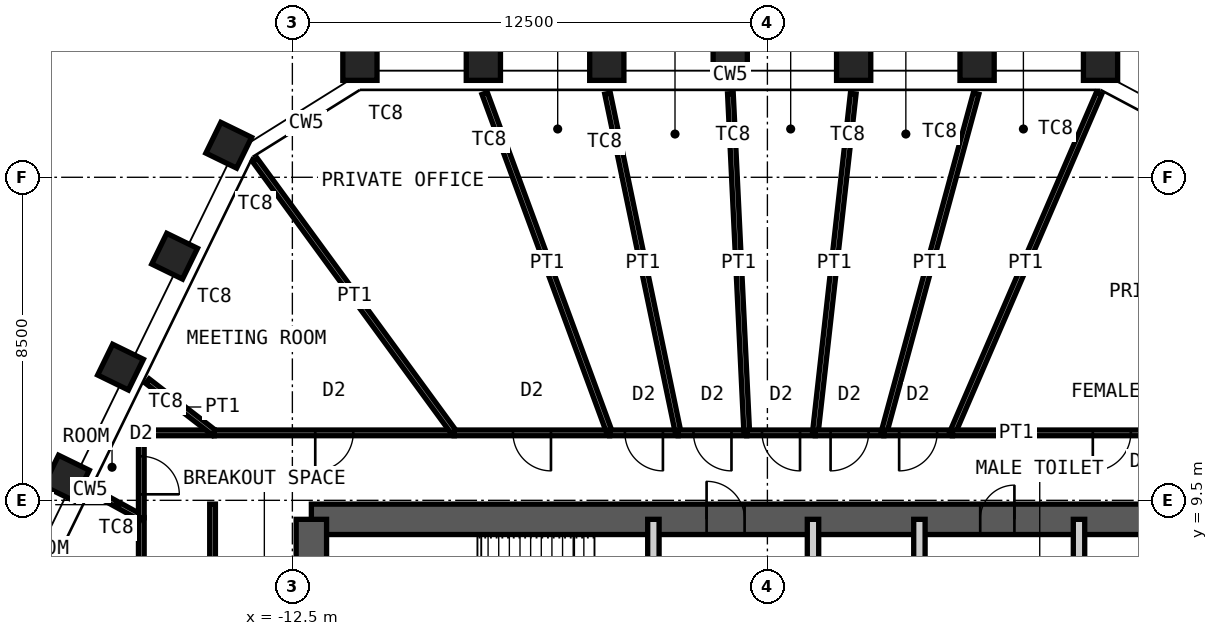
"""IFC4 building model, lengths in metres.
Left out: names, types, materials, properties, quantities, classifications, styles, units other than length and angle.
Written with IfcOpenShell. Run it as: python <this file> out.ifc"""

import sys

from ifc_helpers import new_model, si_unit, direction, frame, frame_2d, origin, origin_2d, place, context, subcontext, project, spatial, rectangle, hollow_rectangle, extrude, element, fill, save


model = new_model("IFC4")
c1 = context("Model", 3, precision=1e-05, world=origin(), true_north=direction((0.0, 1.0)))
c2 = subcontext(c1, "Body", "Model", "MODEL_VIEW")
j1 = project(units=[si_unit("LENGTHUNIT", "METRE"), si_unit("PLANEANGLEUNIT", "RADIAN")], contexts=[c1])
p1 = place(None, origin())
s1 = spatial("IfcSite", under=j1, at=p1, CompositionType="ELEMENT")
p2 = place(p1, origin())
s2 = spatial("IfcBuilding", under=s1, at=p2, CompositionType="ELEMENT")
p3 = place(p2, frame((0.0, 0.0, 312.4)))
s3 = spatial("IfcBuildingStorey", under=s2, at=p3, CompositionType="ELEMENT", Elevation=312.4)
for number, where, z_axis, x_axis in (
    (1, (-10.722, 21.0, 0.0), (0.0, 0.0, 1.0), (-1.0, 0.0, 0.0)),
    (2, (-7.474, 21.0, 0.0), (0.0, 0.0, 1.0), (-1.0, 0.0, 0.0)),
    (3, (-4.226, 21.0, 0.0), (0.0, 0.0, 1.0), (-1.0, 0.0, 0.0)),
    (4, (-0.978, 21.0, 0.0), (0.0, 0.0, 1.0), (-1.0, 0.0, 0.0)),
    (5, (2.27, 21.0, 0.0), (0.0, 0.0, 1.0), (-1.0, 0.0, 0.0)),
    (6, (5.518, 21.0, 0.0), (0.0, 0.0, 1.0), (-1.0, 0.0, 0.0)),
    (7, (8.766, 21.0, 0.0), (0.0, 0.0, 1.0), (-1.0, 0.0, 0.0)),
    (8, (-18.446, 10.085, 0.0), (0.0, 0.0, 1.0), (-0.438, -0.899, 0.0)),
    (9, (-17.022, 13.004, 0.0), (0.0, 0.0, 1.0), (-0.438, -0.899, 0.0)),
    (10, (-15.598, 15.924, 0.0), (0.0, 0.0, 1.0), (-0.438, -0.899, 0.0)),
    (11, (-14.174, 18.843, 0.0), (0.0, 0.0, 1.0), (-0.438, -0.899, 0.0)),
):
    element("IfcColumn", number, at=place(p3, frame(where, z_axis=z_axis, x_axis=x_axis)), inside=s3, PredefinedType="COLUMN", context=c2, shape_type="SweptSolid", body=[
        extrude(hollow_rectangle(XDim=0.9, YDim=0.9, WallThickness=0.05, at=origin_2d()), origin(), (0.0, 0.0, 1.0), 4.2),
    ])
p4 = place(p3, frame((-12.0, 9.0, 0.0), z_axis=(0.0, 0.0, 1.0), x_axis=(1.0, 0.0, 0.0)))
e12 = element("IfcWall", 12, at=p4, inside=s3, PredefinedType="SHEAR", context=c2, shape_type="SweptSolid", body=[
    extrude(rectangle(XDim=24.0, YDim=0.8, at=frame_2d((12.0, 0.0))), origin(), (0.0, 0.0, 1.0), 4.2),
])
p5 = place(p4, frame((10.4, 0.0, 0.0)))
e13 = element("IfcOpeningElement", 13, at=p5, cuts=e12, PredefinedType="OPENING", context=c2, shape_type="SweptSolid", body=[
    extrude(rectangle(XDim=1.0, YDim=2.1, at=frame_2d((0.5, 1.05))), frame((0.0, 0.41, 0.0), z_axis=(0.0, -1.0, 0.0), x_axis=(1.0, 0.0, 0.0)), (0.0, 0.0, 1.0), 0.82),
])
p6 = place(p4, frame((17.6, 0.0, 0.0)))
e14 = element("IfcOpeningElement", 14, at=p6, cuts=e12, PredefinedType="OPENING", context=c2, shape_type="SweptSolid", body=[
    extrude(rectangle(XDim=0.9, YDim=2.1, at=frame_2d((0.45, 1.05))), frame((0.0, 0.41, 0.0), z_axis=(0.0, -1.0, 0.0), x_axis=(1.0, 0.0, 0.0)), (0.0, 0.0, 1.0), 0.82),
])
p7 = place(p4, frame((21.9, 0.0, 0.0)))
e15 = element("IfcOpeningElement", 15, at=p7, cuts=e12, PredefinedType="OPENING", context=c2, shape_type="SweptSolid", body=[
    extrude(rectangle(XDim=0.9, YDim=2.1, at=frame_2d((0.45, 1.05))), frame((0.0, 0.41, 0.0), z_axis=(0.0, -1.0, 0.0), x_axis=(1.0, 0.0, 0.0)), (0.0, 0.0, 1.0), 0.82),
])
p8 = place(p3, frame((-12.0, -9.0, 0.0), z_axis=(0.0, 0.0, 1.0), x_axis=(0.0, 1.0, 0.0)))
e16 = element("IfcWall", 16, at=p8, inside=s3, PredefinedType="SHEAR", context=c2, shape_type="SweptSolid", body=[
    extrude(rectangle(XDim=18.0, YDim=0.8, at=frame_2d((9.0, 0.0))), origin(), (0.0, 0.0, 1.0), 4.2),
])
p9 = place(p8, frame((8.1, 0.0, 0.0)))
e17 = element("IfcOpeningElement", 17, at=p9, cuts=e16, PredefinedType="OPENING", context=c2, shape_type="SweptSolid", body=[
    extrude(rectangle(XDim=1.8, YDim=2.1, at=frame_2d((0.9, 1.05))), frame((0.0, 0.41, 0.0), z_axis=(0.0, -1.0, 0.0), x_axis=(1.0, 0.0, 0.0)), (0.0, 0.0, 1.0), 0.82),
])
p10 = place(p3, frame((-3.0, 5.15, 0.0), z_axis=(0.0, 0.0, 1.0), x_axis=(0.0, 1.0, 0.0)))
e18 = element("IfcWall", 18, at=p10, inside=s3, PredefinedType="PARTITIONING", context=c2, shape_type="SweptSolid", body=[
    extrude(rectangle(XDim=3.85, YDim=0.3, at=frame_2d((1.925, 0.0))), origin(), (0.0, 0.0, 1.0), 3.98),
])
p11 = place(p10, frame((1.425, 0.0, 0.0)))
e19 = element("IfcOpeningElement", 19, at=p11, cuts=e18, PredefinedType="OPENING", context=c2, shape_type="SweptSolid", body=[
    extrude(rectangle(XDim=1.0, YDim=2.1, at=frame_2d((0.5, 1.05))), frame((0.0, 0.16, 0.0), z_axis=(0.0, -1.0, 0.0), x_axis=(1.0, 0.0, 0.0)), (0.0, 0.0, 1.0), 0.32),
])
p12 = place(p3, frame((1.2, 5.15, 0.0), z_axis=(0.0, 0.0, 1.0), x_axis=(0.0, 1.0, 0.0)))
e20 = element("IfcWall", 20, at=p12, inside=s3, PredefinedType="PARTITIONING", context=c2, shape_type="SweptSolid", body=[
    extrude(rectangle(XDim=3.85, YDim=0.3, at=frame_2d((1.925, 0.0))), origin(), (0.0, 0.0, 1.0), 3.98),
])
p13 = place(p12, frame((1.375, 0.0, 0.0)))
e21 = element("IfcOpeningElement", 21, at=p13, cuts=e20, PredefinedType="OPENING", context=c2, shape_type="SweptSolid", body=[
    extrude(rectangle(XDim=1.1, YDim=2.4, at=frame_2d((0.55, 1.2))), frame((0.0, 0.16, 0.0), z_axis=(0.0, -1.0, 0.0), x_axis=(1.0, 0.0, 0.0)), (0.0, 0.0, 1.0), 0.32),
])
for number, where, z_axis, x_axis in (
    (22, (4.0, 5.15, 0.0), (0.0, 0.0, 1.0), (0.0, 1.0, 0.0)),
    (23, (8.2, 5.15, 0.0), (0.0, 0.0, 1.0), (0.0, 1.0, 0.0)),
):
    element("IfcWall", number, at=place(p3, frame(where, z_axis=z_axis, x_axis=x_axis)), inside=s3, PredefinedType="PARTITIONING", context=c2, shape_type="SweptSolid", body=[
        extrude(rectangle(XDim=3.85, YDim=0.3, at=frame_2d((1.925, 0.0))), origin(), (0.0, 0.0, 1.0), 3.98),
    ])
p14 = place(p3, frame((-16.475, 5.873, 0.0), z_axis=(0.0, 0.0, 1.0), x_axis=(0.0, 1.0, 0.0)))
e24 = element("IfcWall", 24, at=p14, inside=s3, PredefinedType="PARTITIONING", context=c2, shape_type="SweptSolid", body=[
    extrude(rectangle(XDim=3.169, YDim=0.15, at=frame_2d((1.584, 0.0))), origin(), (0.0, 0.0, 1.0), 4.03),
])
p15 = place(p14, frame((1.084, 0.0, 0.0)))
e25 = element("IfcOpeningElement", 25, at=p15, cuts=e24, PredefinedType="OPENING", context=c2, shape_type="SweptSolid", body=[
    extrude(rectangle(XDim=1.0, YDim=2.4, at=frame_2d((0.5, 1.2))), frame((0.0, 0.085, 0.0), z_axis=(0.0, -1.0, 0.0), x_axis=(1.0, 0.0, 0.0)), (0.0, 0.0, 1.0), 0.17),
])
p16 = place(p3, frame((-17.729, 9.73, 0.0), z_axis=(0.0, 0.0, 1.0), x_axis=(0.876633607687, -0.481158516369, 0.0)))
e26 = element("IfcWall", 26, at=p16, inside=s3, PredefinedType="PARTITIONING", context=c2, shape_type="SweptSolid", body=[
    extrude(rectangle(XDim=1.43, YDim=0.15, at=frame_2d((0.715, 0.0))), origin(), (0.0, 0.0, 1.0), 3.33),
])
p17 = place(p3, frame((-16.475, 9.042, 0.0), z_axis=(0.0, 0.0, 1.0), x_axis=(0.0, 1.0, 0.0)))
e27 = element("IfcWall", 27, at=p17, inside=s3, PredefinedType="PARTITIONING", context=c2, shape_type="SweptSolid", body=[
    extrude(rectangle(XDim=2.233, YDim=0.15, at=frame_2d((1.117, 0.0))), origin(), (0.0, 0.0, 1.0), 4.03),
])
p18 = place(p17, frame((0.617, 0.0, 0.0)))
e28 = element("IfcOpeningElement", 28, at=p18, cuts=e27, PredefinedType="OPENING", context=c2, shape_type="SweptSolid", body=[
    extrude(rectangle(XDim=1.0, YDim=2.4, at=frame_2d((0.5, 1.2))), frame((0.0, 0.085, 0.0), z_axis=(0.0, -1.0, 0.0), x_axis=(1.0, 0.0, 0.0)), (0.0, 0.0, 1.0), 0.17),
])
p19 = place(p3, frame((-16.475, 11.275, 0.0), z_axis=(0.0, 0.0, 1.0), x_axis=(1.0, 0.0, 0.0)))
e29 = element("IfcWall", 29, at=p19, inside=s3, PredefinedType="PARTITIONING", context=c2, shape_type="SweptSolid", body=[
    extrude(rectangle(XDim=1.919, YDim=0.15, at=frame_2d((0.959, 0.0))), origin(), (0.0, 0.0, 1.0), 4.03),
])
p20 = place(p3, frame((-16.314, 12.636, 0.0), z_axis=(0.0, 0.0, 1.0), x_axis=(0.790545318909, -0.612403542406, 0.0)))
e30 = element("IfcWall", 30, at=p20, inside=s3, PredefinedType="PARTITIONING", context=c2, shape_type="SweptSolid", body=[
    extrude(rectangle(XDim=2.223, YDim=0.15, at=frame_2d((1.111, 0.0))), origin(), (0.0, 0.0, 1.0), 3.33),
])
p21 = place(p3, frame((-14.556, 11.275, 0.0), z_axis=(0.0, 0.0, 1.0), x_axis=(1.0, 0.0, 0.0)))
e31 = element("IfcWall", 31, at=p21, inside=s3, PredefinedType="PARTITIONING", context=c2, shape_type="SweptSolid", body=[
    extrude(rectangle(XDim=6.317, YDim=0.15, at=frame_2d((3.159, 0.0))), origin(), (0.0, 0.0, 1.0), 4.03),
])
p22 = place(p21, frame((2.659, 0.0, 0.0)))
e32 = element("IfcOpeningElement", 32, at=p22, cuts=e31, PredefinedType="OPENING", context=c2, shape_type="SweptSolid", body=[
    extrude(rectangle(XDim=1.0, YDim=2.4, at=frame_2d((0.5, 1.2))), frame((0.0, 0.085, 0.0), z_axis=(0.0, -1.0, 0.0), x_axis=(1.0, 0.0, 0.0)), (0.0, 0.0, 1.0), 0.17),
])
p23 = place(p3, frame((-13.486, 18.455, 0.0), z_axis=(0.0, 0.0, 1.0), x_axis=(0.589986991866, -0.80741275035, 0.0)))
e33 = element("IfcWall", 33, at=p23, inside=s3, PredefinedType="PARTITIONING", context=c2, shape_type="SweptSolid", body=[
    extrude(rectangle(XDim=8.893, YDim=0.15, at=frame_2d((4.447, 0.0))), origin(), (0.0, 0.0, 1.0), 2.93),
])
p24 = place(p3, frame((-8.239, 11.275, 0.0), z_axis=(0.0, 0.0, 1.0), x_axis=(1.0, 0.0, 0.0)))
e34 = element("IfcWall", 34, at=p24, inside=s3, PredefinedType="PARTITIONING", context=c2, shape_type="SweptSolid", body=[
    extrude(rectangle(XDim=4.088, YDim=0.15, at=frame_2d((2.044, 0.0))), origin(), (0.0, 0.0, 1.0), 4.03),
])
p25 = place(p24, frame((1.544, 0.0, 0.0)))
e35 = element("IfcOpeningElement", 35, at=p25, cuts=e34, PredefinedType="OPENING", context=c2, shape_type="SweptSolid", body=[
    extrude(rectangle(XDim=1.0, YDim=2.4, at=frame_2d((0.5, 1.2))), frame((0.0, 0.085, 0.0), z_axis=(0.0, -1.0, 0.0), x_axis=(1.0, 0.0, 0.0)), (0.0, 0.0, 1.0), 0.17),
])
p26 = place(p3, frame((-7.44, 20.206, 0.0), z_axis=(0.0, 0.0, 1.0), x_axis=(0.345511582319, -0.93841448544, 0.0)))
e36 = element("IfcWall", 36, at=p26, inside=s3, PredefinedType="PARTITIONING", context=c2, shape_type="SweptSolid", body=[
    extrude(rectangle(XDim=9.517, YDim=0.15, at=frame_2d((4.759, 0.0))), origin(), (0.0, 0.0, 1.0), 3.33),
])
p27 = place(p3, frame((-4.151, 11.275, 0.0), z_axis=(0.0, 0.0, 1.0), x_axis=(1.0, 0.0, 0.0)))
e37 = element("IfcWall", 37, at=p27, inside=s3, PredefinedType="PARTITIONING", context=c2, shape_type="SweptSolid", body=[
    extrude(rectangle(XDim=1.804, YDim=0.15, at=frame_2d((0.902, 0.0))), origin(), (0.0, 0.0, 1.0), 4.03),
])
p28 = place(p27, frame((0.402, 0.0, 0.0)))
e38 = element("IfcOpeningElement", 38, at=p28, cuts=e37, PredefinedType="OPENING", context=c2, shape_type="SweptSolid", body=[
    extrude(rectangle(XDim=1.0, YDim=2.4, at=frame_2d((0.5, 1.2))), frame((0.0, 0.085, 0.0), z_axis=(0.0, -1.0, 0.0), x_axis=(1.0, 0.0, 0.0)), (0.0, 0.0, 1.0), 0.17),
])
p29 = place(p3, frame((-4.206, 20.202, 0.0), z_axis=(0.0, 0.0, 1.0), x_axis=(0.203802429316, -0.97901203762, 0.0)))
e39 = element("IfcWall", 39, at=p29, inside=s3, PredefinedType="PARTITIONING", context=c2, shape_type="SweptSolid", body=[
    extrude(rectangle(XDim=9.119, YDim=0.15, at=frame_2d((4.559, 0.0))), origin(), (0.0, 0.0, 1.0), 3.33),
])
p30 = place(p3, frame((-2.347, 11.275, 0.0), z_axis=(0.0, 0.0, 1.0), x_axis=(1.0, 0.0, 0.0)))
e40 = element("IfcWall", 40, at=p30, inside=s3, PredefinedType="PARTITIONING", context=c2, shape_type="SweptSolid", body=[
    extrude(rectangle(XDim=1.804, YDim=0.15, at=frame_2d((0.902, 0.0))), origin(), (0.0, 0.0, 1.0), 4.03),
])
p31 = place(p30, frame((0.402, 0.0, 0.0)))
e41 = element("IfcOpeningElement", 41, at=p31, cuts=e40, PredefinedType="OPENING", context=c2, shape_type="SweptSolid", body=[
    extrude(rectangle(XDim=1.0, YDim=2.4, at=frame_2d((0.5, 1.2))), frame((0.0, 0.085, 0.0), z_axis=(0.0, -1.0, 0.0), x_axis=(1.0, 0.0, 0.0)), (0.0, 0.0, 1.0), 0.17),
])
p32 = place(p3, frame((-0.973, 20.2, 0.0), z_axis=(0.0, 0.0, 1.0), x_axis=(0.04814150135, -0.998840525734, 0.0)))
e42 = element("IfcWall", 42, at=p32, inside=s3, PredefinedType="PARTITIONING", context=c2, shape_type="SweptSolid", body=[
    extrude(rectangle(XDim=8.936, YDim=0.15, at=frame_2d((4.468, 0.0))), origin(), (0.0, 0.0, 1.0), 3.33),
])
p33 = place(p3, frame((-0.543, 11.275, 0.0), z_axis=(0.0, 0.0, 1.0), x_axis=(1.0, 0.0, 0.0)))
e43 = element("IfcWall", 43, at=p33, inside=s3, PredefinedType="PARTITIONING", context=c2, shape_type="SweptSolid", body=[
    extrude(rectangle(XDim=1.804, YDim=0.15, at=frame_2d((0.902, 0.0))), origin(), (0.0, 0.0, 1.0), 4.03),
])
p34 = place(p33, frame((0.402, 0.0, 0.0)))
e44 = element("IfcOpeningElement", 44, at=p34, cuts=e43, PredefinedType="OPENING", context=c2, shape_type="SweptSolid", body=[
    extrude(rectangle(XDim=1.0, YDim=2.4, at=frame_2d((0.5, 1.2))), frame((0.0, 0.085, 0.0), z_axis=(0.0, -1.0, 0.0), x_axis=(1.0, 0.0, 0.0)), (0.0, 0.0, 1.0), 0.17),
])
p35 = place(p3, frame((2.259, 20.201, 0.0), z_axis=(0.0, 0.0, 1.0), x_axis=(-0.111123668582, -0.993806585952, 0.0)))
e45 = element("IfcWall", 45, at=p35, inside=s3, PredefinedType="PARTITIONING", context=c2, shape_type="SweptSolid", body=[
    extrude(rectangle(XDim=8.981, YDim=0.15, at=frame_2d((4.491, 0.0))), origin(), (0.0, 0.0, 1.0), 3.33),
])
p36 = place(p3, frame((1.261, 11.275, 0.0), z_axis=(0.0, 0.0, 1.0), x_axis=(1.0, 0.0, 0.0)))
e46 = element("IfcWall", 46, at=p36, inside=s3, PredefinedType="PARTITIONING", context=c2, shape_type="SweptSolid", body=[
    extrude(rectangle(XDim=1.804, YDim=0.15, at=frame_2d((0.902, 0.0))), origin(), (0.0, 0.0, 1.0), 4.03),
])
p37 = place(p36, frame((0.402, 0.0, 0.0)))
e47 = element("IfcOpeningElement", 47, at=p37, cuts=e46, PredefinedType="OPENING", context=c2, shape_type="SweptSolid", body=[
    extrude(rectangle(XDim=1.0, YDim=2.4, at=frame_2d((0.5, 1.2))), frame((0.0, 0.085, 0.0), z_axis=(0.0, -1.0, 0.0), x_axis=(1.0, 0.0, 0.0)), (0.0, 0.0, 1.0), 0.17),
])
p38 = place(p3, frame((5.492, 20.204, 0.0), z_axis=(0.0, 0.0, 1.0), x_axis=(-0.262302393053, -0.964985727666, 0.0)))
e48 = element("IfcWall", 48, at=p38, inside=s3, PredefinedType="PARTITIONING", context=c2, shape_type="SweptSolid", body=[
    extrude(rectangle(XDim=9.253, YDim=0.15, at=frame_2d((4.626, 0.0))), origin(), (0.0, 0.0, 1.0), 3.33),
])
p39 = place(p3, frame((3.065, 11.275, 0.0), z_axis=(0.0, 0.0, 1.0), x_axis=(1.0, 0.0, 0.0)))
e49 = element("IfcWall", 49, at=p39, inside=s3, PredefinedType="PARTITIONING", context=c2, shape_type="SweptSolid", body=[
    extrude(rectangle(XDim=1.804, YDim=0.15, at=frame_2d((0.902, 0.0))), origin(), (0.0, 0.0, 1.0), 4.03),
])
p40 = place(p39, frame((0.402, 0.0, 0.0)))
e50 = element("IfcOpeningElement", 50, at=p40, cuts=e49, PredefinedType="OPENING", context=c2, shape_type="SweptSolid", body=[
    extrude(rectangle(XDim=1.0, YDim=2.4, at=frame_2d((0.5, 1.2))), frame((0.0, 0.085, 0.0), z_axis=(0.0, -1.0, 0.0), x_axis=(1.0, 0.0, 0.0)), (0.0, 0.0, 1.0), 0.17),
])
p41 = place(p3, frame((8.726, 20.208, 0.0), z_axis=(0.0, 0.0, 1.0), x_axis=(-0.39644322536, -0.918059240499, 0.0)))
e51 = element("IfcWall", 51, at=p41, inside=s3, PredefinedType="PARTITIONING", context=c2, shape_type="SweptSolid", body=[
    extrude(rectangle(XDim=9.731, YDim=0.15, at=frame_2d((4.865, 0.0))), origin(), (0.0, 0.0, 1.0), 2.93),
])
p42 = place(p3, frame((4.869, 11.275, 0.0), z_axis=(0.0, 0.0, 1.0), x_axis=(1.0, 0.0, 0.0)))
e52 = element("IfcWall", 52, at=p42, inside=s3, PredefinedType="PARTITIONING", context=c2, shape_type="SweptSolid", body=[
    extrude(rectangle(XDim=8.389, YDim=0.15, at=frame_2d((4.194, 0.0))), origin(), (0.0, 0.0, 1.0), 4.03),
])
p43 = place(p42, frame((3.694, 0.0, 0.0)))
e53 = element("IfcOpeningElement", 53, at=p43, cuts=e52, PredefinedType="OPENING", context=c2, shape_type="SweptSolid", body=[
    extrude(rectangle(XDim=1.0, YDim=2.4, at=frame_2d((0.5, 1.2))), frame((0.0, 0.085, 0.0), z_axis=(0.0, -1.0, 0.0), x_axis=(1.0, 0.0, 0.0)), (0.0, 0.0, 1.0), 0.17),
])
p44 = place(p3, frame((-14.6, 1.9, 0.0), z_axis=(0.0, 0.0, 1.0), x_axis=(0.0, 1.0, 0.0)))
e54 = element("IfcWall", 54, at=p44, inside=s3, PredefinedType="PARTITIONING", context=c2, shape_type="SweptSolid", body=[
    extrude(rectangle(XDim=7.5, YDim=0.15, at=frame_2d((3.75, 0.0))), origin(), (0.0, 0.0, 1.0), 4.03),
])
p45 = place(p5, origin())
e55 = element("IfcDoor", 55, at=p45, inside=s3, OperationType="SINGLE_SWING_RIGHT", PredefinedType="DOOR", context=c2, shape_type="SweptSolid", body=[
    extrude(rectangle(XDim=1.0, YDim=2.1, at=frame_2d((0.5, 1.05))), frame((0.0, 0.025, 0.0), z_axis=(0.0, -1.0, 0.0), x_axis=(1.0, 0.0, 0.0)), (0.0, 0.0, 1.0), 0.05),
])
fill(e13, e55)
p46 = place(p6, origin())
e56 = element("IfcDoor", 56, at=p46, inside=s3, OperationType="SINGLE_SWING_LEFT", PredefinedType="DOOR", context=c2, shape_type="SweptSolid", body=[
    extrude(rectangle(XDim=0.9, YDim=2.1, at=frame_2d((0.45, 1.05))), frame((0.0, 0.025, 0.0), z_axis=(0.0, -1.0, 0.0), x_axis=(1.0, 0.0, 0.0)), (0.0, 0.0, 1.0), 0.05),
])
fill(e14, e56)
p47 = place(p18, origin())
e57 = element("IfcDoor", 57, at=p47, inside=s3, OperationType="SINGLE_SWING_LEFT", PredefinedType="DOOR", context=c2, shape_type="SweptSolid", body=[
    extrude(rectangle(XDim=1.0, YDim=2.4, at=frame_2d((0.5, 1.2))), frame((0.0, 0.025, 0.0), z_axis=(0.0, -1.0, 0.0), x_axis=(1.0, 0.0, 0.0)), (0.0, 0.0, 1.0), 0.05),
])
fill(e28, e57)
p48 = place(p22, origin())
e58 = element("IfcDoor", 58, at=p48, inside=s3, OperationType="SINGLE_SWING_LEFT", PredefinedType="DOOR", context=c2, shape_type="SweptSolid", body=[
    extrude(rectangle(XDim=1.0, YDim=2.4, at=frame_2d((0.5, 1.2))), frame((0.0, 0.025, 0.0), z_axis=(0.0, -1.0, 0.0), x_axis=(1.0, 0.0, 0.0)), (0.0, 0.0, 1.0), 0.05),
])
fill(e32, e58)
p49 = place(p25, origin())
e59 = element("IfcDoor", 59, at=p49, inside=s3, OperationType="SINGLE_SWING_RIGHT", PredefinedType="DOOR", context=c2, shape_type="SweptSolid", body=[
    extrude(rectangle(XDim=1.0, YDim=2.4, at=frame_2d((0.5, 1.2))), frame((0.0, 0.025, 0.0), z_axis=(0.0, -1.0, 0.0), x_axis=(1.0, 0.0, 0.0)), (0.0, 0.0, 1.0), 0.05),
])
fill(e35, e59)
p50 = place(p28, origin())
e60 = element("IfcDoor", 60, at=p50, inside=s3, OperationType="SINGLE_SWING_RIGHT", PredefinedType="DOOR", context=c2, shape_type="SweptSolid", body=[
    extrude(rectangle(XDim=1.0, YDim=2.4, at=frame_2d((0.5, 1.2))), frame((0.0, 0.025, 0.0), z_axis=(0.0, -1.0, 0.0), x_axis=(1.0, 0.0, 0.0)), (0.0, 0.0, 1.0), 0.05),
])
fill(e38, e60)
p51 = place(p31, origin())
e61 = element("IfcDoor", 61, at=p51, inside=s3, OperationType="SINGLE_SWING_RIGHT", PredefinedType="DOOR", context=c2, shape_type="SweptSolid", body=[
    extrude(rectangle(XDim=1.0, YDim=2.4, at=frame_2d((0.5, 1.2))), frame((0.0, 0.025, 0.0), z_axis=(0.0, -1.0, 0.0), x_axis=(1.0, 0.0, 0.0)), (0.0, 0.0, 1.0), 0.05),
])
fill(e41, e61)
p52 = place(p34, origin())
e62 = element("IfcDoor", 62, at=p52, inside=s3, OperationType="SINGLE_SWING_RIGHT", PredefinedType="DOOR", context=c2, shape_type="SweptSolid", body=[
    extrude(rectangle(XDim=1.0, YDim=2.4, at=frame_2d((0.5, 1.2))), frame((0.0, 0.025, 0.0), z_axis=(0.0, -1.0, 0.0), x_axis=(1.0, 0.0, 0.0)), (0.0, 0.0, 1.0), 0.05),
])
fill(e44, e62)
p53 = place(p37, origin())
e63 = element("IfcDoor", 63, at=p53, inside=s3, OperationType="SINGLE_SWING_LEFT", PredefinedType="DOOR", context=c2, shape_type="SweptSolid", body=[
    extrude(rectangle(XDim=1.0, YDim=2.4, at=frame_2d((0.5, 1.2))), frame((0.0, 0.025, 0.0), z_axis=(0.0, -1.0, 0.0), x_axis=(1.0, 0.0, 0.0)), (0.0, 0.0, 1.0), 0.05),
])
fill(e47, e63)
p54 = place(p40, origin())
e64 = element("IfcDoor", 64, at=p54, inside=s3, OperationType="SINGLE_SWING_LEFT", PredefinedType="DOOR", context=c2, shape_type="SweptSolid", body=[
    extrude(rectangle(XDim=1.0, YDim=2.4, at=frame_2d((0.5, 1.2))), frame((0.0, 0.025, 0.0), z_axis=(0.0, -1.0, 0.0), x_axis=(1.0, 0.0, 0.0)), (0.0, 0.0, 1.0), 0.05),
])
fill(e50, e64)
p55 = place(p43, origin())
e65 = element("IfcDoor", 65, at=p55, inside=s3, OperationType="SINGLE_SWING_LEFT", PredefinedType="DOOR", context=c2, shape_type="SweptSolid", body=[
    extrude(rectangle(XDim=1.0, YDim=2.4, at=frame_2d((0.5, 1.2))), frame((0.0, 0.025, 0.0), z_axis=(0.0, -1.0, 0.0), x_axis=(1.0, 0.0, 0.0)), (0.0, 0.0, 1.0), 0.05),
])
fill(e53, e65)
save(model, sys.argv[1])
